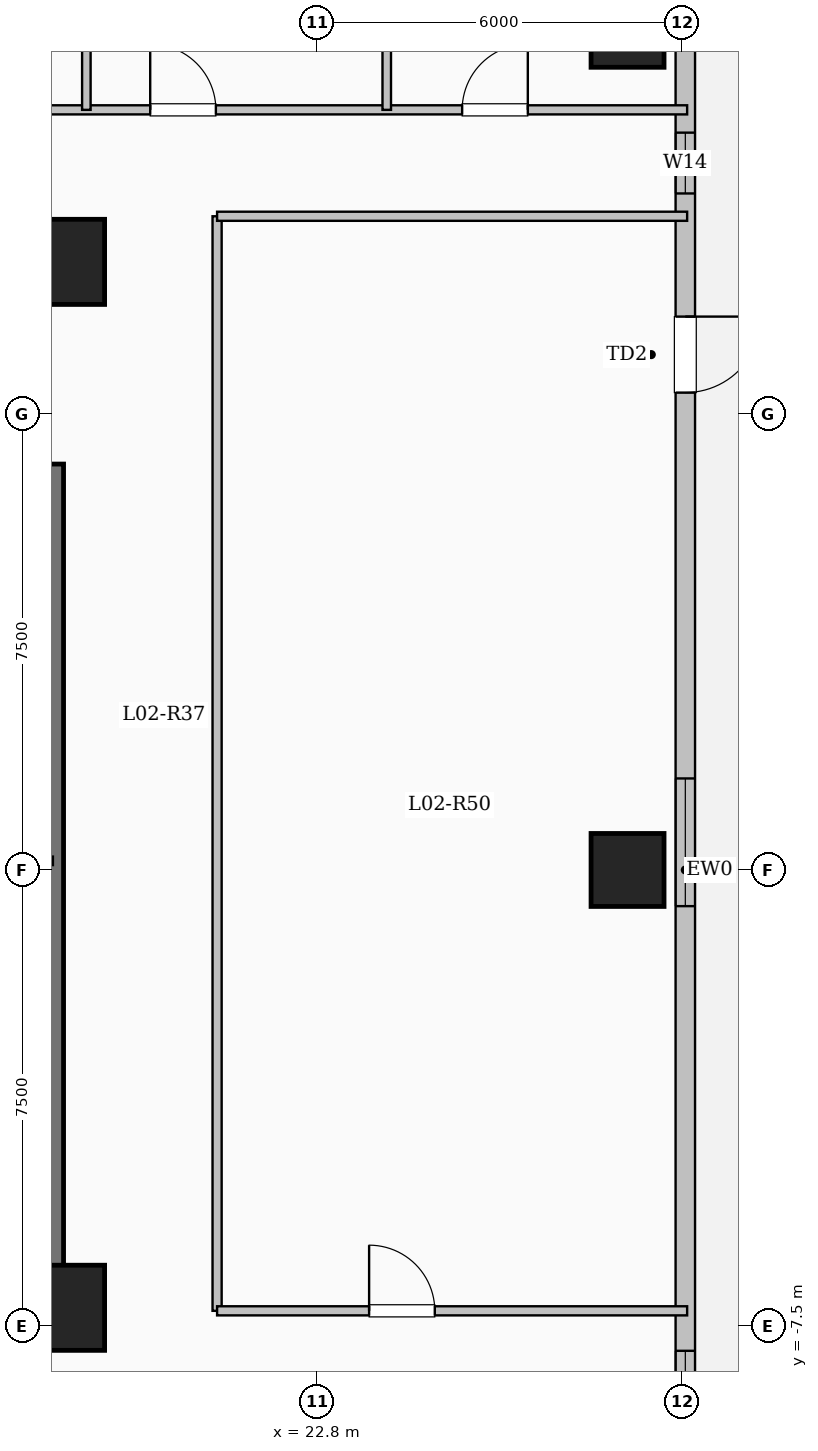
"""IFC4 building model, lengths in metres.
Left out: names, types, materials, properties, quantities, classifications, styles, units other than length and angle.
Written with IfcOpenShell. Run it as: python <this file> out.ifc"""

import sys

from ifc_helpers import new_model, si_unit, direction, frame, frame_2d, origin, origin_2d, place, context, subcontext, project, spatial, rectangle, extrude, element, fill, save


model = new_model("IFC4")
c1 = context("Model", 3, precision=1e-05, world=origin(), true_north=direction((0.0, 1.0)))
c2 = subcontext(c1, "Body", "Model", "MODEL_VIEW")
j1 = project(units=[si_unit("LENGTHUNIT", "METRE"), si_unit("PLANEANGLEUNIT", "RADIAN")], contexts=[c1])
p1 = place(None, origin())
s1 = spatial("IfcSite", under=j1, at=p1, CompositionType="ELEMENT")
p2 = place(p1, origin())
s2 = spatial("IfcBuilding", under=s1, at=p2, CompositionType="ELEMENT")
p3 = place(p2, frame((0.0, 0.0, 9.9)))
s3 = spatial("IfcBuildingStorey", under=s2, at=p3, CompositionType="ELEMENT", Elevation=9.9)
for number, where, z_axis, x_axis in (
    (1, (18.6, -7.2, 0.0), (0.0, 0.0, 1.0), (1.0, 0.0, 0.0)),
    (2, (18.6, 10.0, 0.0), (0.0, 0.0, 1.0), (1.0, 0.0, 0.0)),
):
    element("IfcColumn", number, at=place(p3, frame(where, z_axis=z_axis, x_axis=x_axis)), inside=s3, PredefinedType="COLUMN", context=c2, shape_type="SweptSolid", body=[
        extrude(rectangle(XDim=1.4, YDim=1.4, at=origin_2d()), origin(), (0.0, 0.0, 1.0), 4.5),
    ])
for number, where, z_axis, x_axis in (
    (3, (27.9, 0.0, 0.0), (0.0, 0.0, 1.0), (1.0, 0.0, 0.0)),
    (4, (27.9, 13.8, 0.0), (0.0, 0.0, 1.0), (1.0, 0.0, 0.0)),
):
    element("IfcColumn", number, at=place(p3, frame(where, z_axis=z_axis, x_axis=x_axis)), inside=s3, PredefinedType="COLUMN", context=c2, shape_type="SweptSolid", body=[
        extrude(rectangle(XDim=1.2, YDim=1.2, at=origin_2d()), origin(), (0.0, 0.0, 1.0), 4.5),
    ])
p4 = place(p3, frame((28.85, 29.85, 0.0), z_axis=(0.0, 0.0, 1.0), x_axis=(0.0, -1.0, 0.0)))
e5 = element("IfcWall", 5, at=p4, inside=s3, PredefinedType="SOLIDWALL", context=c2, shape_type="SweptSolid", body=[
    extrude(rectangle(XDim=59.7, YDim=0.32, at=frame_2d((29.85, 0.0))), origin(), (0.0, 0.0, 1.0), 4.2),
])
p5 = place(p4, frame((20.75, 0.0, 0.0)))
e6 = element("IfcOpeningElement", 6, at=p5, cuts=e5, PredefinedType="OPENING", context=c2, shape_type="SweptSolid", body=[
    extrude(rectangle(XDim=1.25, YDim=2.25, at=frame_2d((0.625, 1.125))), frame((0.0, 0.17, 0.0), z_axis=(0.0, -1.0, 0.0), x_axis=(1.0, 0.0, 0.0)), (0.0, 0.0, 1.0), 0.34),
])
p6 = place(p4, frame((7.6, 0.0, 0.9)))
e7 = element("IfcOpeningElement", 7, at=p6, cuts=e5, PredefinedType="OPENING", context=c2, shape_type="SweptSolid", body=[
    extrude(rectangle(XDim=2.1, YDim=2.0, at=frame_2d((1.05, 1.0))), frame((0.0, 0.17, 0.0), z_axis=(0.0, -1.0, 0.0), x_axis=(1.0, 0.0, 0.0)), (0.0, 0.0, 1.0), 0.34),
])
p7 = place(p4, frame((17.725, 0.0, 0.95)))
e8 = element("IfcOpeningElement", 8, at=p7, cuts=e5, PredefinedType="OPENING", context=c2, shape_type="SweptSolid", body=[
    extrude(rectangle(XDim=1.0, YDim=1.5, at=frame_2d((0.5, 0.75))), frame((0.0, 0.17, 0.0), z_axis=(0.0, -1.0, 0.0), x_axis=(1.0, 0.0, 0.0)), (0.0, 0.0, 1.0), 0.34),
])
p8 = place(p4, frame((28.345, 0.0, 0.9)))
e9 = element("IfcOpeningElement", 9, at=p8, cuts=e5, PredefinedType="OPENING", context=c2, shape_type="SweptSolid", body=[
    extrude(rectangle(XDim=2.1, YDim=2.0, at=frame_2d((1.05, 1.0))), frame((0.0, 0.17, 0.0), z_axis=(0.0, -1.0, 0.0), x_axis=(1.0, 0.0, 0.0)), (0.0, 0.0, 1.0), 0.34),
])
p9 = place(p4, frame((37.758, 0.0, 0.9)))
e10 = element("IfcOpeningElement", 10, at=p9, cuts=e5, PredefinedType="OPENING", context=c2, shape_type="SweptSolid", body=[
    extrude(rectangle(XDim=1.7, YDim=1.9, at=frame_2d((0.85, 0.95))), frame((0.0, 0.17, 0.0), z_axis=(0.0, -1.0, 0.0), x_axis=(1.0, 0.0, 0.0)), (0.0, 0.0, 1.0), 0.34),
])
p10 = place(p3, frame((18.45, -7.375, 0.0), z_axis=(0.0, 0.0, 1.0), x_axis=(0.0, 1.0, 0.0)))
e11 = element("IfcWall", 11, at=p10, inside=s3, PredefinedType="SHEAR", context=c2, shape_type="SweptSolid", body=[
    extrude(rectangle(XDim=14.05, YDim=0.35, at=frame_2d((7.025, 0.0))), origin(), (0.0, 0.0, 1.0), 4.5),
])
p11 = place(p3, frame((10.075, -7.2, 0.0), z_axis=(0.0, 0.0, 1.0), x_axis=(1.0, 0.0, 0.0)))
e12 = element("IfcWall", 12, at=p11, inside=s3, PredefinedType="SHEAR", context=c2, shape_type="SweptSolid", body=[
    extrude(rectangle(XDim=8.55, YDim=0.35, at=frame_2d((4.275, 0.0))), origin(), (0.0, 0.0, 1.0), 4.5),
])
p12 = place(p3, frame((3.85, 12.5, 0.0), z_axis=(0.0, 0.0, 1.0), x_axis=(1.0, 0.0, 0.0)))
e13 = element("IfcWall", 13, at=p12, inside=s3, PredefinedType="PARTITIONING", context=c2, shape_type="SweptSolid", body=[
    extrude(rectangle(XDim=25.03, YDim=0.15, at=frame_2d((12.515, 0.0))), origin(), (0.0, 0.0, 1.0), 4.2),
])
p13 = place(p12, frame((1.2, 0.0, 0.0)))
e14 = element("IfcOpeningElement", 14, at=p13, cuts=e13, PredefinedType="OPENING", context=c2, shape_type="SweptSolid", body=[
    extrude(rectangle(XDim=0.95, YDim=2.15, at=frame_2d((0.475, 1.075))), frame((0.0, 0.085, 0.0), z_axis=(0.0, -1.0, 0.0), x_axis=(1.0, 0.0, 0.0)), (0.0, 0.0, 1.0), 0.17),
])
p14 = place(p12, frame((4.6, 0.0, 0.0)))
e15 = element("IfcOpeningElement", 15, at=p14, cuts=e13, PredefinedType="OPENING", context=c2, shape_type="SweptSolid", body=[
    extrude(rectangle(XDim=0.95, YDim=2.15, at=frame_2d((0.475, 1.075))), frame((0.0, 0.085, 0.0), z_axis=(0.0, -1.0, 0.0), x_axis=(1.0, 0.0, 0.0)), (0.0, 0.0, 1.0), 0.17),
])
p15 = place(p12, frame((9.1, 0.0, 0.0)))
e16 = element("IfcOpeningElement", 16, at=p15, cuts=e13, PredefinedType="OPENING", context=c2, shape_type="SweptSolid", body=[
    extrude(rectangle(XDim=0.95, YDim=2.15, at=frame_2d((0.475, 1.075))), frame((0.0, 0.085, 0.0), z_axis=(0.0, -1.0, 0.0), x_axis=(1.0, 0.0, 0.0)), (0.0, 0.0, 1.0), 0.17),
])
p16 = place(p12, frame((16.2, 0.0, 0.0)))
e17 = element("IfcOpeningElement", 17, at=p16, cuts=e13, PredefinedType="OPENING", context=c2, shape_type="SweptSolid", body=[
    extrude(rectangle(XDim=1.08, YDim=2.15, at=frame_2d((0.54, 1.075))), frame((0.0, 0.085, 0.0), z_axis=(0.0, -1.0, 0.0), x_axis=(1.0, 0.0, 0.0)), (0.0, 0.0, 1.0), 0.17),
])
p17 = place(p12, frame((21.33, 0.0, 0.0)))
e18 = element("IfcOpeningElement", 18, at=p17, cuts=e13, PredefinedType="OPENING", context=c2, shape_type="SweptSolid", body=[
    extrude(rectangle(XDim=1.08, YDim=2.15, at=frame_2d((0.54, 1.075))), frame((0.0, 0.085, 0.0), z_axis=(0.0, -1.0, 0.0), x_axis=(1.0, 0.0, 0.0)), (0.0, 0.0, 1.0), 0.17),
])
p18 = place(p3, frame((21.15, -7.25, 0.0), z_axis=(0.0, 0.0, 1.0), x_axis=(0.0, 1.0, 0.0)))
e19 = element("IfcWall", 19, at=p18, inside=s3, PredefinedType="PARTITIONING", context=c2, shape_type="SweptSolid", body=[
    extrude(rectangle(XDim=18.0, YDim=0.15, at=frame_2d((9.0, 0.0))), origin(), (0.0, 0.0, 1.0), 4.2),
])
for number, where, z_axis, x_axis in (
    (20, (19.0, 12.5, 0.0), (0.0, 0.0, 1.0), (0.0, 1.0, 0.0)),
    (21, (23.94, 12.5, 0.0), (0.0, 0.0, 1.0), (0.0, 1.0, 0.0)),
):
    element("IfcWall", number, at=place(p3, frame(where, z_axis=z_axis, x_axis=x_axis)), inside=s3, PredefinedType="PARTITIONING", context=c2, shape_type="SweptSolid", body=[
        extrude(rectangle(XDim=17.38, YDim=0.14, at=frame_2d((8.69, 0.0))), origin(), (0.0, 0.0, 1.0), 4.2),
    ])
p19 = place(p3, frame((21.15, -7.25, 0.0), z_axis=(0.0, 0.0, 1.0), x_axis=(1.0, 0.0, 0.0)))
e22 = element("IfcWall", 22, at=p19, inside=s3, PredefinedType="PARTITIONING", context=c2, shape_type="SweptSolid", body=[
    extrude(rectangle(XDim=7.73, YDim=0.15, at=frame_2d((3.865, 0.0))), origin(), (0.0, 0.0, 1.0), 4.2),
])
p20 = place(p19, frame((2.5, 0.0, 0.0)))
e23 = element("IfcOpeningElement", 23, at=p20, cuts=e22, PredefinedType="OPENING", context=c2, shape_type="SweptSolid", body=[
    extrude(rectangle(XDim=1.08, YDim=2.15, at=frame_2d((0.54, 1.075))), frame((0.0, 0.085, 0.0), z_axis=(0.0, -1.0, 0.0), x_axis=(1.0, 0.0, 0.0)), (0.0, 0.0, 1.0), 0.17),
])
p21 = place(p3, frame((21.15, 10.75, 0.0), z_axis=(0.0, 0.0, 1.0), x_axis=(1.0, 0.0, 0.0)))
e24 = element("IfcWall", 24, at=p21, inside=s3, PredefinedType="PARTITIONING", context=c2, shape_type="SweptSolid", body=[
    extrude(rectangle(XDim=7.73, YDim=0.15, at=frame_2d((3.865, 0.0))), origin(), (0.0, 0.0, 1.0), 4.2),
])
p22 = place(p5, origin())
e25 = element("IfcDoor", 25, at=p22, inside=s3, OperationType="SINGLE_SWING_LEFT", PredefinedType="DOOR", context=c2, shape_type="SweptSolid", body=[
    extrude(rectangle(XDim=1.25, YDim=2.25, at=frame_2d((0.625, 1.125))), frame((0.0, 0.025, 0.0), z_axis=(0.0, -1.0, 0.0), x_axis=(1.0, 0.0, 0.0)), (0.0, 0.0, 1.0), 0.05),
])
fill(e6, e25)
p23 = place(p7, origin())
e26 = element("IfcWindow", 26, at=p23, inside=s3, PartitioningType="SINGLE_PANEL", PredefinedType="WINDOW", context=c2, shape_type="SweptSolid", body=[
    extrude(rectangle(XDim=1.0, YDim=1.5, at=frame_2d((0.5, 0.75))), frame((0.0, 0.03, 0.0), z_axis=(0.0, -1.0, 0.0), x_axis=(1.0, 0.0, 0.0)), (0.0, 0.0, 1.0), 0.06),
])
fill(e8, e26)
p24 = place(p8, origin())
e27 = element("IfcWindow", 27, at=p24, inside=s3, PartitioningType="SINGLE_PANEL", PredefinedType="WINDOW", context=c2, shape_type="SweptSolid", body=[
    extrude(rectangle(XDim=2.1, YDim=2.0, at=frame_2d((1.05, 1.0))), frame((0.0, 0.03, 0.0), z_axis=(0.0, -1.0, 0.0), x_axis=(1.0, 0.0, 0.0)), (0.0, 0.0, 1.0), 0.06),
])
fill(e9, e27)
p25 = place(p9, origin())
e28 = element("IfcWindow", 28, at=p25, inside=s3, PartitioningType="SINGLE_PANEL", PredefinedType="WINDOW", context=c2, shape_type="SweptSolid", body=[
    extrude(rectangle(XDim=1.7, YDim=1.9, at=frame_2d((0.85, 0.95))), frame((0.0, 0.03, 0.0), z_axis=(0.0, -1.0, 0.0), x_axis=(1.0, 0.0, 0.0)), (0.0, 0.0, 1.0), 0.06),
])
fill(e10, e28)
p26 = place(p16, origin())
e29 = element("IfcDoor", 29, at=p26, inside=s3, OperationType="SINGLE_SWING_LEFT", PredefinedType="DOOR", context=c2, shape_type="SweptSolid", body=[
    extrude(rectangle(XDim=1.08, YDim=2.15, at=frame_2d((0.54, 1.075))), frame((0.0, 0.025, 0.0), z_axis=(0.0, -1.0, 0.0), x_axis=(1.0, 0.0, 0.0)), (0.0, 0.0, 1.0), 0.05),
])
fill(e17, e29)
p27 = place(p17, origin())
e30 = element("IfcDoor", 30, at=p27, inside=s3, OperationType="SINGLE_SWING_RIGHT", PredefinedType="DOOR", context=c2, shape_type="SweptSolid", body=[
    extrude(rectangle(XDim=1.08, YDim=2.15, at=frame_2d((0.54, 1.075))), frame((0.0, 0.025, 0.0), z_axis=(0.0, -1.0, 0.0), x_axis=(1.0, 0.0, 0.0)), (0.0, 0.0, 1.0), 0.05),
])
fill(e18, e30)
p28 = place(p20, origin())
e31 = element("IfcDoor", 31, at=p28, inside=s3, OperationType="SINGLE_SWING_LEFT", PredefinedType="DOOR", context=c2, shape_type="SweptSolid", body=[
    extrude(rectangle(XDim=1.08, YDim=2.15, at=frame_2d((0.54, 1.075))), frame((0.0, 0.025, 0.0), z_axis=(0.0, -1.0, 0.0), x_axis=(1.0, 0.0, 0.0)), (0.0, 0.0, 1.0), 0.05),
])
fill(e23, e31)
save(model, sys.argv[1])
